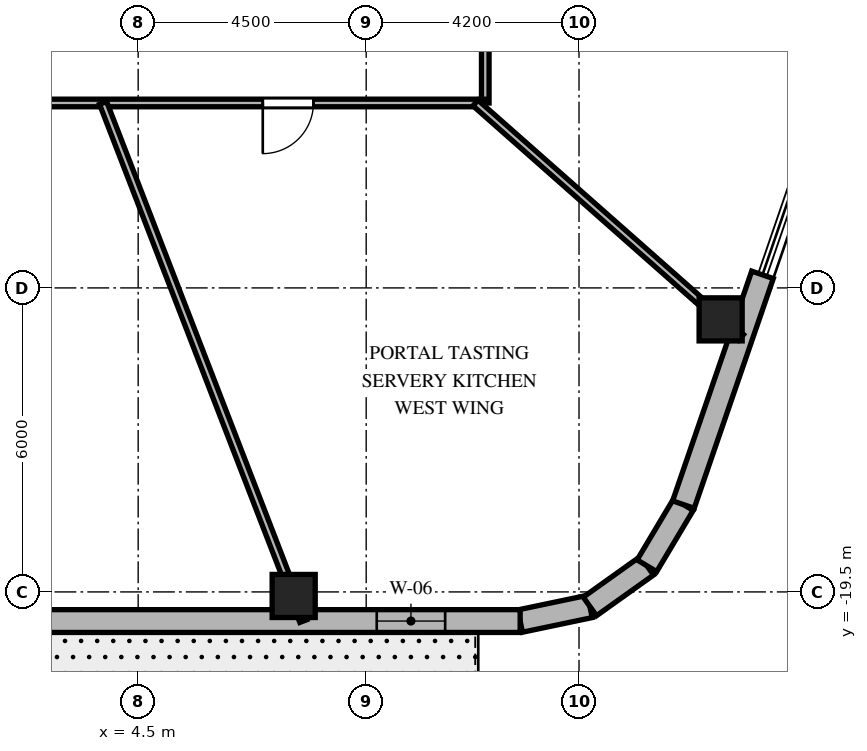
"""IFC4 building model, lengths in metres.
Left out: names, types, materials, properties, quantities, classifications, styles, units other than length and angle.
Written with IfcOpenShell. Run it as: python <this file> out.ifc"""

import sys

from ifc_helpers import new_model, si_unit, direction, frame, frame_2d, origin, origin_2d, place, context, subcontext, project, spatial, rectangle, extrude, element, fill, save


model = new_model("IFC4")
c1 = context("Model", 3, precision=1e-05, world=origin(), true_north=direction((0.0, 1.0)))
c2 = subcontext(c1, "Body", "Model", "MODEL_VIEW")
j1 = project(units=[si_unit("LENGTHUNIT", "METRE"), si_unit("PLANEANGLEUNIT", "RADIAN")], contexts=[c1])
p1 = place(None, origin())
s1 = spatial("IfcSite", under=j1, at=p1, CompositionType="ELEMENT")
p2 = place(p1, origin())
s2 = spatial("IfcBuilding", under=s1, at=p2, CompositionType="ELEMENT")
p3 = place(p2, frame((0.0, 0.0, 288.6)))
s3 = spatial("IfcBuildingStorey", under=s2, at=p3, CompositionType="ELEMENT", Elevation=288.6)
for number, where, z_axis, x_axis in (
    (1, (7.569, -19.58, 0.0), (0.0, 0.0, 1.0), (1.0, 0.0, 0.0)),
    (2, (15.995, -14.121, 0.0), (0.0, 0.0, 1.0), (1.0, 0.0, 0.0)),
):
    element("IfcColumn", number, at=place(p3, frame(where, z_axis=z_axis, x_axis=x_axis)), inside=s3, PredefinedType="COLUMN", context=c2, shape_type="SweptSolid", body=[
        extrude(rectangle(XDim=0.85, YDim=0.85, at=origin_2d()), origin(), (0.0, 0.0, 1.0), 4.5),
    ])
p4 = place(p3, frame((12.038, -20.075, 0.0), z_axis=(0.0, 0.0, 1.0), x_axis=(0.978750122553, 0.205056571711, 0.0)))
e3 = element("IfcWall", 3, at=p4, inside=s3, PredefinedType="SOLIDWALL", context=c2, shape_type="SweptSolid", body=[
    extrude(rectangle(XDim=1.406, YDim=0.45, at=frame_2d((0.703, 0.0))), origin(), (0.0, 0.0, 1.0), 4.18),
])
p5 = place(p3, frame((13.415, -19.787, 0.0), z_axis=(0.0, 0.0, 1.0), x_axis=(0.814055493997, 0.580787097561, 0.0)))
e4 = element("IfcWall", 4, at=p5, inside=s3, PredefinedType="SOLIDWALL", context=c2, shape_type="SweptSolid", body=[
    extrude(rectangle(XDim=1.383, YDim=0.45, at=frame_2d((0.691, 0.0))), origin(), (0.0, 0.0, 1.0), 4.18),
])
p6 = place(p3, frame((14.54, -18.984, 0.0), z_axis=(0.0, 0.0, 1.0), x_axis=(0.512374906623, 0.858761873317, 0.0)))
e5 = element("IfcWall", 5, at=p6, inside=s3, PredefinedType="SOLIDWALL", context=c2, shape_type="SweptSolid", body=[
    extrude(rectangle(XDim=1.406, YDim=0.45, at=frame_2d((0.703, 0.0))), origin(), (0.0, 0.0, 1.0), 4.18),
])
p7 = place(p3, frame((-10.379, -20.075, 0.0), z_axis=(0.0, 0.0, 1.0), x_axis=(1.0, 0.0, 0.0)))
e6 = element("IfcWall", 6, at=p7, inside=s3, PredefinedType="SOLIDWALL", context=c2, shape_type="SweptSolid", body=[
    extrude(rectangle(XDim=22.417, YDim=0.45, at=frame_2d((11.208, 0.0))), origin(), (0.0, 0.0, 1.0), 4.18),
])
p8 = place(p7, frame((2.302, 0.0, 0.0)))
e7 = element("IfcOpeningElement", 7, at=p8, cuts=e6, PredefinedType="OPENING", context=c2, shape_type="SweptSolid", body=[
    extrude(rectangle(XDim=1.0, YDim=2.15, at=frame_2d((0.5, 1.075))), frame((0.0, 0.235, 0.0), z_axis=(0.0, -1.0, 0.0), x_axis=(1.0, 0.0, 0.0)), (0.0, 0.0, 1.0), 0.47),
])
p9 = place(p7, frame((10.534, 0.0, 0.8)))
e8 = element("IfcOpeningElement", 8, at=p9, cuts=e6, PredefinedType="OPENING", context=c2, shape_type="SweptSolid", body=[
    extrude(rectangle(XDim=1.35, YDim=1.75, at=frame_2d((0.675, 0.875))), frame((0.0, 0.235, 0.0), z_axis=(0.0, -1.0, 0.0), x_axis=(1.0, 0.0, 0.0)), (0.0, 0.0, 1.0), 0.47),
])
p10 = place(p7, frame((19.587, 0.0, 0.8)))
e9 = element("IfcOpeningElement", 9, at=p10, cuts=e6, PredefinedType="OPENING", context=c2, shape_type="SweptSolid", body=[
    extrude(rectangle(XDim=1.35, YDim=1.75, at=frame_2d((0.675, 0.875))), frame((0.0, 0.235, 0.0), z_axis=(0.0, -1.0, 0.0), x_axis=(1.0, 0.0, 0.0)), (0.0, 0.0, 1.0), 0.47),
])
p11 = place(p3, frame((15.26, -17.776, 0.0), z_axis=(0.0, 0.0, 1.0), x_axis=(0.325408461582, 0.945573547182, 0.0)))
e10 = element("IfcWall", 10, at=p11, inside=s3, PredefinedType="SOLIDWALL", context=c2, shape_type="SweptSolid", body=[
    extrude(rectangle(XDim=4.795, YDim=0.45, at=frame_2d((2.397, 0.0))), origin(), (0.0, 0.0, 1.0), 4.18),
])
p12 = place(p3, frame((11.35, 9.85, 0.0), z_axis=(0.0, 0.0, 1.0), x_axis=(0.0, -1.0, 0.0)))
e11 = element("IfcWall", 11, at=p12, inside=s3, PredefinedType="PARTITIONING", context=c2, shape_type="SweptSolid", body=[
    extrude(rectangle(XDim=19.7, YDim=0.15, at=frame_2d((9.85, 0.0))), origin(), (0.0, 0.0, 1.0), 3.67),
])
p13 = place(p12, frame((2.973, 0.0, 0.0)))
e12 = element("IfcOpeningElement", 12, at=p13, cuts=e11, PredefinedType="OPENING", context=c2, shape_type="SweptSolid", body=[
    extrude(rectangle(XDim=1.0, YDim=2.03, at=frame_2d((0.5, 1.015))), frame((0.0, 0.085, 0.0), z_axis=(0.0, -1.0, 0.0), x_axis=(1.0, 0.0, 0.0)), (0.0, 0.0, 1.0), 0.17),
])
p14 = place(p12, frame((15.189, 0.0, 0.0)))
e13 = element("IfcOpeningElement", 13, at=p14, cuts=e11, PredefinedType="OPENING", context=c2, shape_type="SweptSolid", body=[
    extrude(rectangle(XDim=1.0, YDim=2.03, at=frame_2d((0.5, 1.015))), frame((0.0, 0.085, 0.0), z_axis=(0.0, -1.0, 0.0), x_axis=(1.0, 0.0, 0.0)), (0.0, 0.0, 1.0), 0.17),
])
p15 = place(p12, frame((8.81, 0.0, 0.0)))
e14 = element("IfcOpeningElement", 14, at=p15, cuts=e11, PredefinedType="OPENING", context=c2, shape_type="SweptSolid", body=[
    extrude(rectangle(XDim=1.0, YDim=2.03, at=frame_2d((0.5, 1.015))), frame((0.0, 0.085, 0.0), z_axis=(0.0, -1.0, 0.0), x_axis=(1.0, 0.0, 0.0)), (0.0, 0.0, 1.0), 0.17),
])
p16 = place(p3, frame((11.35, -9.85, 0.0), z_axis=(0.0, 0.0, 1.0), x_axis=(-1.0, 0.0, 0.0)))
e15 = element("IfcWall", 15, at=p16, inside=s3, PredefinedType="PARTITIONING", context=c2, shape_type="SweptSolid", body=[
    extrude(rectangle(XDim=22.7, YDim=0.15, at=frame_2d((11.35, 0.0))), origin(), (0.0, 0.0, 1.0), 3.67),
])
p17 = place(p16, frame((17.22, 0.0, 0.0)))
e16 = element("IfcOpeningElement", 16, at=p17, cuts=e15, PredefinedType="OPENING", context=c2, shape_type="SweptSolid", body=[
    extrude(rectangle(XDim=1.0, YDim=2.03, at=frame_2d((0.5, 1.015))), frame((0.0, 0.085, 0.0), z_axis=(0.0, -1.0, 0.0), x_axis=(1.0, 0.0, 0.0)), (0.0, 0.0, 1.0), 0.17),
])
p18 = place(p16, frame((10.429, 0.0, 0.0)))
e17 = element("IfcOpeningElement", 17, at=p18, cuts=e15, PredefinedType="OPENING", context=c2, shape_type="SweptSolid", body=[
    extrude(rectangle(XDim=1.0, YDim=2.03, at=frame_2d((0.5, 1.015))), frame((0.0, 0.085, 0.0), z_axis=(0.0, -1.0, 0.0), x_axis=(1.0, 0.0, 0.0)), (0.0, 0.0, 1.0), 0.17),
])
p19 = place(p16, frame((3.391, 0.0, 0.0)))
e18 = element("IfcOpeningElement", 18, at=p19, cuts=e15, PredefinedType="OPENING", context=c2, shape_type="SweptSolid", body=[
    extrude(rectangle(XDim=1.0, YDim=2.03, at=frame_2d((0.5, 1.015))), frame((0.0, 0.085, 0.0), z_axis=(0.0, -1.0, 0.0), x_axis=(1.0, 0.0, 0.0)), (0.0, 0.0, 1.0), 0.17),
])
p20 = place(p3, frame((3.808, -9.85, 0.0), z_axis=(0.0, 0.0, 1.0), x_axis=(0.360587327934, -0.932725457427, 0.0)))
e19 = element("IfcWall", 19, at=p20, inside=s3, PredefinedType="PARTITIONING", context=c2, shape_type="SweptSolid", body=[
    extrude(rectangle(XDim=10.962, YDim=0.15, at=frame_2d((5.481, 0.0))), origin(), (0.0, 0.0, 1.0), 3.52),
])
p21 = place(p3, frame((11.157, -9.85, 0.0), z_axis=(0.0, 0.0, 1.0), x_axis=(0.74966962095, -0.661812253909, 0.0)))
e20 = element("IfcWall", 20, at=p21, inside=s3, PredefinedType="PARTITIONING", context=c2, shape_type="SweptSolid", body=[
    extrude(rectangle(XDim=6.989, YDim=0.15, at=frame_2d((3.494, 0.0))), origin(), (0.0, 0.0, 1.0), 3.52),
])
p22 = place(p10, origin())
e21 = element("IfcWindow", 21, at=p22, inside=s3, PartitioningType="SINGLE_PANEL", PredefinedType="WINDOW", context=c2, shape_type="SweptSolid", body=[
    extrude(rectangle(XDim=1.35, YDim=1.75, at=frame_2d((0.675, 0.875))), frame((0.0, 0.03, 0.0), z_axis=(0.0, -1.0, 0.0), x_axis=(1.0, 0.0, 0.0)), (0.0, 0.0, 1.0), 0.06),
])
fill(e9, e21)
p23 = place(p19, origin())
e22 = element("IfcDoor", 22, at=p23, inside=s3, OperationType="SINGLE_SWING_RIGHT", PredefinedType="DOOR", context=c2, shape_type="SweptSolid", body=[
    extrude(rectangle(XDim=1.0, YDim=2.03, at=frame_2d((0.5, 1.015))), frame((0.0, 0.025, 0.0), z_axis=(0.0, -1.0, 0.0), x_axis=(1.0, 0.0, 0.0)), (0.0, 0.0, 1.0), 0.05),
])
fill(e18, e22)
save(model, sys.argv[1])
